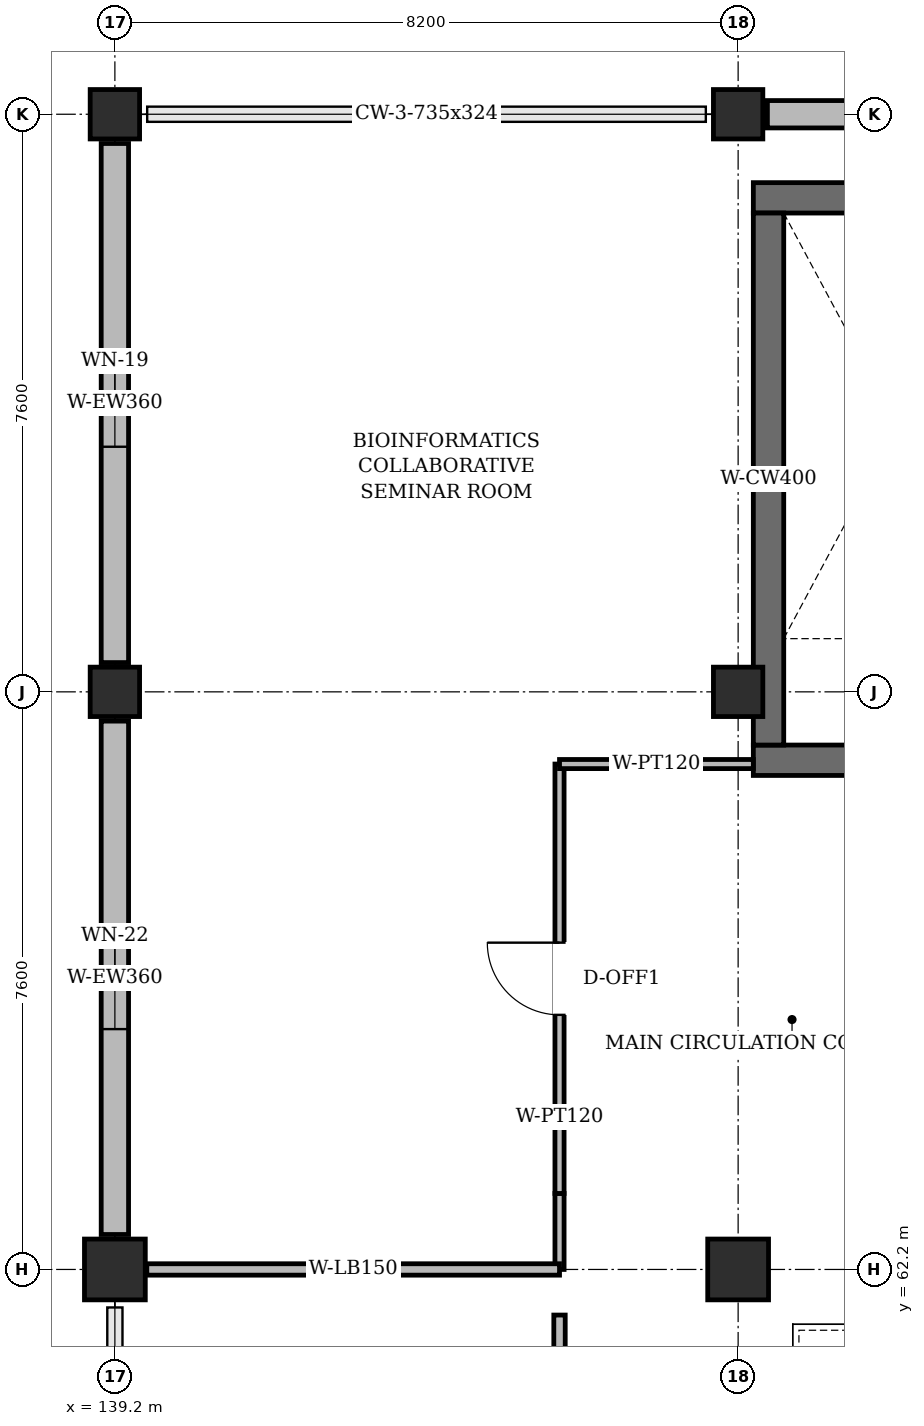
"""IFC4 building model, lengths in metres.
Left out: names, types, materials, properties, quantities, classifications, styles, units other than length and angle.
Written with IfcOpenShell. Run it as: python <this file> out.ifc"""

import sys

from ifc_helpers import new_model, si_unit, direction, frame, frame_2d, origin, origin_2d, place, context, subcontext, project, spatial, rectangle, extrude, element, fill, save


model = new_model("IFC4")
c1 = context("Model", 3, precision=1e-05, world=origin(), true_north=direction((0.0, 1.0)))
c2 = subcontext(c1, "Body", "Model", "MODEL_VIEW")
j1 = project(units=[si_unit("LENGTHUNIT", "METRE"), si_unit("PLANEANGLEUNIT", "RADIAN")], contexts=[c1])
p1 = place(None, origin())
s1 = spatial("IfcSite", under=j1, at=p1, CompositionType="ELEMENT")
p2 = place(p1, origin())
s2 = spatial("IfcBuilding", under=s1, at=p2, CompositionType="ELEMENT")
p3 = place(p2, frame((0.0, 0.0, 32.4)))
s3 = spatial("IfcBuildingStorey", under=s2, at=p3, CompositionType="ELEMENT", Elevation=32.4)
p4 = place(p3, frame((139.2, 62.2, 0.0), z_axis=(0.0, 0.0, 1.0), x_axis=(1.0, 0.0, 0.0)))
e1 = element("IfcColumn", 1, at=p4, inside=s3, PredefinedType="COLUMN", context=c2, shape_type="SweptSolid", body=[
    extrude(rectangle(XDim=0.8, YDim=0.8, at=origin_2d()), origin(), (0.0, 0.0, 1.0), 3.89),
])
for number, where, z_axis, x_axis in (
    (2, (139.2, 69.8, 0.0), (0.0, 0.0, 1.0), (1.0, 0.0, 0.0)),
    (3, (139.2, 77.4, 0.0), (0.0, 0.0, 1.0), (1.0, 0.0, 0.0)),
):
    element("IfcColumn", number, at=place(p3, frame(where, z_axis=z_axis, x_axis=x_axis)), inside=s3, PredefinedType="COLUMN", context=c2, shape_type="SweptSolid", body=[
        extrude(rectangle(XDim=0.65, YDim=0.65, at=origin_2d()), origin(), (0.0, 0.0, 1.0), 3.84),
    ])
p5 = place(p3, frame((147.4, 62.2, 0.0), z_axis=(0.0, 0.0, 1.0), x_axis=(1.0, 0.0, 0.0)))
e4 = element("IfcColumn", 4, at=p5, inside=s3, PredefinedType="COLUMN", context=c2, shape_type="SweptSolid", body=[
    extrude(rectangle(XDim=0.8, YDim=0.8, at=origin_2d()), origin(), (0.0, 0.0, 1.0), 3.89),
])
for number, where, z_axis, x_axis in (
    (5, (147.4, 69.8, 0.0), (0.0, 0.0, 1.0), (1.0, 0.0, 0.0)),
    (6, (147.4, 77.4, 0.0), (0.0, 0.0, 1.0), (1.0, 0.0, 0.0)),
):
    element("IfcColumn", number, at=place(p3, frame(where, z_axis=z_axis, x_axis=x_axis)), inside=s3, PredefinedType="COLUMN", context=c2, shape_type="SweptSolid", body=[
        extrude(rectangle(XDim=0.65, YDim=0.65, at=origin_2d()), origin(), (0.0, 0.0, 1.0), 3.84),
    ])
p6 = place(p3, frame((155.215, 77.4, 0.0), z_axis=(0.0, 0.0, 1.0), x_axis=(-1.0, 0.0, 0.0)))
e7 = element("IfcWall", 7, at=p6, inside=s3, PredefinedType="SOLIDWALL", context=c2, shape_type="SweptSolid", body=[
    extrude(rectangle(XDim=7.43, YDim=0.36, at=frame_2d((3.715, 0.0))), origin(), (0.0, 0.0, 1.0), 3.225),
])
p7 = place(p6, frame((2.54, 0.0, 0.95)))
e8 = element("IfcOpeningElement", 8, at=p7, cuts=e7, PredefinedType="OPENING", context=c2, shape_type="SweptSolid", body=[
    extrude(rectangle(XDim=2.35, YDim=1.25, at=frame_2d((1.175, 0.625))), frame((0.0, 0.192, 0.0), z_axis=(0.0, -1.0, 0.0), x_axis=(1.0, 0.0, 0.0)), (0.0, 0.0, 1.0), 0.384),
])
p8 = place(p3, frame((139.2, 77.015, 0.0), z_axis=(0.0, 0.0, 1.0), x_axis=(0.0, -1.0, 0.0)))
e9 = element("IfcWall", 9, at=p8, inside=s3, PredefinedType="SOLIDWALL", context=c2, shape_type="SweptSolid", body=[
    extrude(rectangle(XDim=6.83, YDim=0.36, at=frame_2d((3.415, 0.0))), origin(), (0.0, 0.0, 1.0), 3.225),
])
p9 = place(p8, frame((2.84, 0.0, 0.95)))
e10 = element("IfcOpeningElement", 10, at=p9, cuts=e9, PredefinedType="OPENING", context=c2, shape_type="SweptSolid", body=[
    extrude(rectangle(XDim=1.15, YDim=1.75, at=frame_2d((0.575, 0.875))), frame((0.0, 0.192, 0.0), z_axis=(0.0, -1.0, 0.0), x_axis=(1.0, 0.0, 0.0)), (0.0, 0.0, 1.0), 0.384),
])
p10 = place(p3, frame((139.2, 69.415, 0.0), z_axis=(0.0, 0.0, 1.0), x_axis=(0.0, -1.0, 0.0)))
e11 = element("IfcWall", 11, at=p10, inside=s3, PredefinedType="SOLIDWALL", context=c2, shape_type="SweptSolid", body=[
    extrude(rectangle(XDim=6.755, YDim=0.36, at=frame_2d((3.377, 0.0))), origin(), (0.0, 0.0, 1.0), 3.275),
])
p11 = place(p10, frame((2.702, 0.0, 0.95)))
e12 = element("IfcOpeningElement", 12, at=p11, cuts=e11, PredefinedType="OPENING", context=c2, shape_type="SweptSolid", body=[
    extrude(rectangle(XDim=1.35, YDim=1.5, at=frame_2d((0.675, 0.75))), frame((0.0, 0.192, 0.0), z_axis=(0.0, -1.0, 0.0), x_axis=(1.0, 0.0, 0.0)), (0.0, 0.0, 1.0), 0.384),
])
p12 = place(p3, frame((147.6, 68.9, 0.0), z_axis=(0.0, 0.0, 1.0), x_axis=(1.0, 0.0, 0.0)))
e13 = element("IfcWall", 13, at=p12, inside=s3, PredefinedType="SHEAR", context=c2, shape_type="SweptSolid", body=[
    extrude(rectangle(XDim=3.8, YDim=0.4, at=frame_2d((1.9, 0.0))), origin(), (0.0, 0.0, 1.0), 3.89),
])
p13 = place(p12, frame((1.3, 0.0, 0.0)))
e14 = element("IfcOpeningElement", 14, at=p13, cuts=e13, PredefinedType="OPENING", context=c2, shape_type="SweptSolid", body=[
    extrude(rectangle(XDim=1.2, YDim=2.2, at=frame_2d((0.6, 1.1))), frame((0.0, 0.212, 0.0), z_axis=(0.0, -1.0, 0.0), x_axis=(1.0, 0.0, 0.0)), (0.0, 0.0, 1.0), 0.424),
])
p14 = place(p3, frame((147.6, 76.3, 0.0), z_axis=(0.0, 0.0, 1.0), x_axis=(1.0, 0.0, 0.0)))
e15 = element("IfcWall", 15, at=p14, inside=s3, PredefinedType="SHEAR", context=c2, shape_type="SweptSolid", body=[
    extrude(rectangle(XDim=3.8, YDim=0.4, at=frame_2d((1.9, 0.0))), origin(), (0.0, 0.0, 1.0), 3.89),
])
p15 = place(p3, frame((147.8, 69.1, 0.0), z_axis=(0.0, 0.0, 1.0), x_axis=(0.0, 1.0, 0.0)))
e16 = element("IfcWall", 16, at=p15, inside=s3, PredefinedType="SHEAR", context=c2, shape_type="SweptSolid", body=[
    extrude(rectangle(XDim=7.0, YDim=0.4, at=frame_2d((3.5, 0.0))), origin(), (0.0, 0.0, 1.0), 3.89),
])
p16 = place(p3, frame((145.05, 46.51, 0.0), z_axis=(0.0, 0.0, 1.0), x_axis=(0.0, 1.0, 0.0)))
e17 = element("IfcWall", 17, at=p16, inside=s3, PredefinedType="PARTITIONING", context=c2, shape_type="SweptSolid", body=[
    extrude(rectangle(XDim=15.09, YDim=0.15, at=frame_2d((7.545, 0.0))), origin(), (0.0, 0.0, 1.0), 3.805),
])
p17 = place(p16, frame((6.845, 0.0, 0.0)))
e18 = element("IfcOpeningElement", 18, at=p17, cuts=e17, PredefinedType="OPENING", context=c2, shape_type="SweptSolid", body=[
    extrude(rectangle(XDim=1.4, YDim=2.2, at=frame_2d((0.7, 1.1))), frame((0.0, 0.087, 0.0), z_axis=(0.0, -1.0, 0.0), x_axis=(1.0, 0.0, 0.0)), (0.0, 0.0, 1.0), 0.174),
])
p18 = place(p3, frame((145.05, 62.2, 0.0), z_axis=(0.0, 0.0, 1.0), x_axis=(0.0, 1.0, 0.0)))
e19 = element("IfcWall", 19, at=p18, inside=s3, PredefinedType="PARTITIONING", context=c2, shape_type="SweptSolid", body=[
    extrude(rectangle(XDim=1.0, YDim=0.12, at=frame_2d((0.5, 0.0))), origin(), (0.0, 0.0, 1.0), 3.805),
])
p19 = place(p3, frame((145.05, 63.2, 0.0), z_axis=(0.0, 0.0, 1.0), x_axis=(0.0, 1.0, 0.0)))
e20 = element("IfcWall", 20, at=p19, inside=s3, PredefinedType="PARTITIONING", context=c2, shape_type="SweptSolid", body=[
    extrude(rectangle(XDim=5.65, YDim=0.12, at=frame_2d((2.825, 0.0))), origin(), (0.0, 0.0, 1.0), 3.805),
])
p20 = place(p19, frame((2.35, 0.0, 0.0)))
e21 = element("IfcOpeningElement", 21, at=p20, cuts=e20, PredefinedType="OPENING", context=c2, shape_type="SweptSolid", body=[
    extrude(rectangle(XDim=0.95, YDim=2.2, at=frame_2d((0.475, 1.1))), frame((0.0, 0.072, 0.0), z_axis=(0.0, -1.0, 0.0), x_axis=(1.0, 0.0, 0.0)), (0.0, 0.0, 1.0), 0.144),
])
p21 = place(p3, frame((145.05, 68.85, 0.0), z_axis=(0.0, 0.0, 1.0), x_axis=(1.0, 0.0, 0.0)))
e22 = element("IfcWall", 22, at=p21, inside=s3, PredefinedType="PARTITIONING", context=c2, shape_type="SweptSolid", body=[
    extrude(rectangle(XDim=2.55, YDim=0.12, at=frame_2d((1.275, 0.0))), origin(), (0.0, 0.0, 1.0), 3.805),
])
p22 = place(p3, frame((139.62, 62.2, 0.0), z_axis=(0.0, 0.0, 1.0), x_axis=(1.0, 0.0, 0.0)))
e23 = element("IfcWall", 23, at=p22, inside=s3, PredefinedType="PARTITIONING", context=c2, shape_type="SweptSolid", body=[
    extrude(rectangle(XDim=5.43, YDim=0.15, at=frame_2d((2.715, 0.0))), origin(), (0.0, 0.0, 1.0), 3.225),
])
p23 = place(p9, origin())
e24 = element("IfcWindow", 24, at=p23, inside=s3, PartitioningType="SINGLE_PANEL", PredefinedType="WINDOW", context=c2, shape_type="SweptSolid", body=[
    extrude(rectangle(XDim=1.15, YDim=1.75, at=frame_2d((0.575, 0.875))), frame((0.0, 0.03, 0.0), z_axis=(0.0, -1.0, 0.0), x_axis=(1.0, 0.0, 0.0)), (0.0, 0.0, 1.0), 0.06),
])
fill(e10, e24)
p24 = place(p11, origin())
e25 = element("IfcWindow", 25, at=p24, inside=s3, PartitioningType="SINGLE_PANEL", PredefinedType="WINDOW", context=c2, shape_type="SweptSolid", body=[
    extrude(rectangle(XDim=1.35, YDim=1.5, at=frame_2d((0.675, 0.75))), frame((0.0, 0.03, 0.0), z_axis=(0.0, -1.0, 0.0), x_axis=(1.0, 0.0, 0.0)), (0.0, 0.0, 1.0), 0.06),
])
fill(e12, e25)
p25 = place(p20, origin())
e26 = element("IfcDoor", 26, at=p25, inside=s3, OperationType="SINGLE_SWING_RIGHT", PredefinedType="DOOR", context=c2, shape_type="SweptSolid", body=[
    extrude(rectangle(XDim=0.95, YDim=2.2, at=frame_2d((0.475, 1.1))), frame((0.0, 0.025, 0.0), z_axis=(0.0, -1.0, 0.0), x_axis=(1.0, 0.0, 0.0)), (0.0, 0.0, 1.0), 0.05),
])
fill(e21, e26)
save(model, sys.argv[1])
